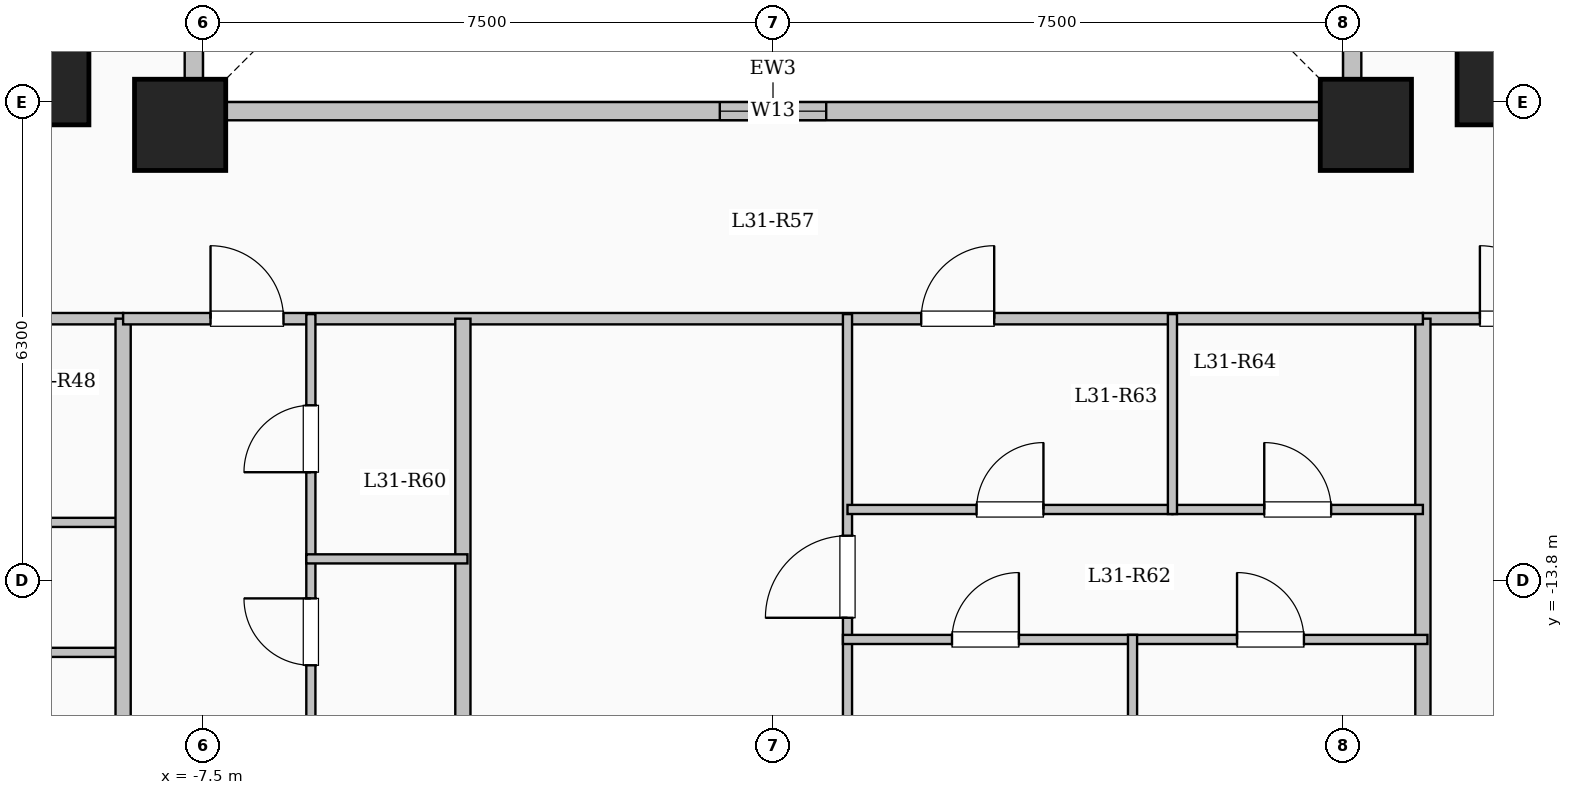
"""IFC4 building model, lengths in metres.
Left out: names, types, materials, properties, quantities, classifications, styles, units other than length and angle.
Written with IfcOpenShell. Run it as: python <this file> out.ifc"""

import sys

from ifc_helpers import new_model, si_unit, direction, frame, frame_2d, origin, origin_2d, place, context, subcontext, project, spatial, rectangle, extrude, element, fill, save


model = new_model("IFC4")
c1 = context("Model", 3, precision=1e-05, world=origin(), true_north=direction((0.0, 1.0)))
c2 = subcontext(c1, "Body", "Model", "MODEL_VIEW")
j1 = project(units=[si_unit("LENGTHUNIT", "METRE"), si_unit("PLANEANGLEUNIT", "RADIAN")], contexts=[c1])
p1 = place(None, origin())
s1 = spatial("IfcSite", under=j1, at=p1, CompositionType="ELEMENT")
p2 = place(p1, origin())
s2 = spatial("IfcBuilding", under=s1, at=p2, CompositionType="ELEMENT")
p3 = place(p2, frame((0.0, 0.0, 115.15)))
s3 = spatial("IfcBuildingStorey", under=s2, at=p3, CompositionType="ELEMENT", Elevation=115.15)
for number, where, z_axis, x_axis in (
    (1, (-7.8, -7.8, 0.0), (0.0, 0.0, 1.0), (1.0, 0.0, 0.0)),
    (2, (7.8, -7.8, 0.0), (0.0, 0.0, 1.0), (1.0, 0.0, 0.0)),
    (3, (-9.6, -7.2, 0.0), (0.0, 0.0, 1.0), (1.0, 0.0, 0.0)),
    (4, (9.6, -7.2, 0.0), (0.0, 0.0, 1.0), (1.0, 0.0, 0.0)),
):
    element("IfcColumn", number, at=place(p3, frame(where, z_axis=z_axis, x_axis=x_axis)), inside=s3, PredefinedType="COLUMN", context=c2, shape_type="SweptSolid", body=[
        extrude(rectangle(XDim=1.2, YDim=1.2, at=origin_2d()), origin(), (0.0, 0.0, 1.0), 3.35),
    ])
p4 = place(p3, frame((-7.62, -7.62, 0.0), z_axis=(0.0, 0.0, 1.0), x_axis=(1.0, 0.0, 0.0)))
e5 = element("IfcWall", 5, at=p4, inside=s3, PredefinedType="SOLIDWALL", context=c2, shape_type="SweptSolid", body=[
    extrude(rectangle(XDim=15.24, YDim=0.24, at=frame_2d((7.62, 0.0))), origin(), (0.0, 0.0, 1.0), 3.05),
])
p5 = place(p4, frame((6.92, 0.0, 0.95)))
e6 = element("IfcOpeningElement", 6, at=p5, cuts=e5, PredefinedType="OPENING", context=c2, shape_type="SweptSolid", body=[
    extrude(rectangle(XDim=1.4, YDim=1.5, at=frame_2d((0.7, 0.75))), frame((0.0, 0.13, 0.0), z_axis=(0.0, -1.0, 0.0), x_axis=(1.0, 0.0, 0.0)), (0.0, 0.0, 1.0), 0.26),
])
p6 = place(p3, frame((7.62, -7.62, 0.0), z_axis=(0.0, 0.0, 1.0), x_axis=(0.0, 1.0, 0.0)))
e7 = element("IfcWall", 7, at=p6, inside=s3, PredefinedType="SOLIDWALL", context=c2, shape_type="SweptSolid", body=[
    extrude(rectangle(XDim=15.24, YDim=0.24, at=frame_2d((7.62, 0.0))), origin(), (0.0, 0.0, 1.0), 3.05),
])
p7 = place(p6, frame((6.92, 0.0, 0.95)))
e8 = element("IfcOpeningElement", 8, at=p7, cuts=e7, PredefinedType="OPENING", context=c2, shape_type="SweptSolid", body=[
    extrude(rectangle(XDim=1.4, YDim=1.5, at=frame_2d((0.7, 0.75))), frame((0.0, 0.13, 0.0), z_axis=(0.0, -1.0, 0.0), x_axis=(1.0, 0.0, 0.0)), (0.0, 0.0, 1.0), 0.26),
])
p8 = place(p3, frame((-7.62, 7.62, 0.0), z_axis=(0.0, 0.0, 1.0), x_axis=(0.0, -1.0, 0.0)))
e9 = element("IfcWall", 9, at=p8, inside=s3, PredefinedType="SOLIDWALL", context=c2, shape_type="SweptSolid", body=[
    extrude(rectangle(XDim=15.24, YDim=0.24, at=frame_2d((7.62, 0.0))), origin(), (0.0, 0.0, 1.0), 3.05),
])
p9 = place(p8, frame((6.92, 0.0, 0.95)))
e10 = element("IfcOpeningElement", 10, at=p9, cuts=e9, PredefinedType="OPENING", context=c2, shape_type="SweptSolid", body=[
    extrude(rectangle(XDim=1.4, YDim=1.5, at=frame_2d((0.7, 0.75))), frame((0.0, 0.13, 0.0), z_axis=(0.0, -1.0, 0.0), x_axis=(1.0, 0.0, 0.0)), (0.0, 0.0, 1.0), 0.26),
])
p10 = place(p3, frame((-21.05, -10.35, 0.0), z_axis=(0.0, 0.0, 1.0), x_axis=(1.0, 0.0, 0.0)))
e11 = element("IfcWall", 11, at=p10, inside=s3, PredefinedType="PARTITIONING", context=c2, shape_type="SweptSolid", body=[
    extrude(rectangle(XDim=12.5, YDim=0.15, at=frame_2d((6.25, 0.0))), origin(), (0.0, 0.0, 1.0), 3.05),
])
p11 = place(p10, frame((0.7, 0.0, 0.0)))
e12 = element("IfcOpeningElement", 12, at=p11, cuts=e11, PredefinedType="OPENING", context=c2, shape_type="SweptSolid", body=[
    extrude(rectangle(XDim=0.96, YDim=2.15, at=frame_2d((0.48, 1.075))), frame((0.0, 0.085, 0.0), z_axis=(0.0, -1.0, 0.0), x_axis=(1.0, 0.0, 0.0)), (0.0, 0.0, 1.0), 0.17),
])
p12 = place(p3, frame((8.55, -10.35, 0.0), z_axis=(0.0, 0.0, 1.0), x_axis=(1.0, 0.0, 0.0)))
e13 = element("IfcWall", 13, at=p12, inside=s3, PredefinedType="PARTITIONING", context=c2, shape_type="SweptSolid", body=[
    extrude(rectangle(XDim=12.5, YDim=0.15, at=frame_2d((6.25, 0.0))), origin(), (0.0, 0.0, 1.0), 3.05),
])
p13 = place(p12, frame((0.75, 0.0, 0.0)))
e14 = element("IfcOpeningElement", 14, at=p13, cuts=e13, PredefinedType="OPENING", context=c2, shape_type="SweptSolid", body=[
    extrude(rectangle(XDim=0.96, YDim=2.15, at=frame_2d((0.48, 1.075))), frame((0.0, 0.085, 0.0), z_axis=(0.0, -1.0, 0.0), x_axis=(1.0, 0.0, 0.0)), (0.0, 0.0, 1.0), 0.17),
])
p14 = place(p3, frame((-11.841, -13.03, 0.0), z_axis=(0.0, 0.0, 1.0), x_axis=(1.0, 0.0, 0.0)))
e15 = element("IfcWall", 15, at=p14, inside=s3, PredefinedType="PARTITIONING", context=c2, shape_type="SweptSolid", body=[
    extrude(rectangle(XDim=3.241, YDim=0.12, at=frame_2d((1.621, 0.0))), origin(), (0.0, 0.0, 1.0), 3.05),
])
p15 = place(p14, frame((1.18, 0.0, 0.0)))
e16 = element("IfcOpeningElement", 16, at=p15, cuts=e15, PredefinedType="OPENING", context=c2, shape_type="SweptSolid", body=[
    extrude(rectangle(XDim=0.88, YDim=2.1, at=frame_2d((0.44, 1.05))), frame((0.0, 0.07, 0.0), z_axis=(0.0, -1.0, 0.0), x_axis=(1.0, 0.0, 0.0)), (0.0, 0.0, 1.0), 0.14),
])
p16 = place(p3, frame((-16.118, -14.74, 0.0), z_axis=(0.0, 0.0, 1.0), x_axis=(1.0, 0.0, 0.0)))
e17 = element("IfcWall", 17, at=p16, inside=s3, PredefinedType="PARTITIONING", context=c2, shape_type="SweptSolid", body=[
    extrude(rectangle(XDim=7.578, YDim=0.12, at=frame_2d((3.789, 0.0))), origin(), (0.0, 0.0, 1.0), 3.05),
])
p17 = place(p16, frame((1.409, 0.0, 0.0)))
e18 = element("IfcOpeningElement", 18, at=p17, cuts=e17, PredefinedType="OPENING", context=c2, shape_type="SweptSolid", body=[
    extrude(rectangle(XDim=0.88, YDim=2.1, at=frame_2d((0.44, 1.05))), frame((0.0, 0.07, 0.0), z_axis=(0.0, -1.0, 0.0), x_axis=(1.0, 0.0, 0.0)), (0.0, 0.0, 1.0), 0.14),
])
p18 = place(p16, frame((5.108, 0.0, 0.0)))
e19 = element("IfcOpeningElement", 19, at=p18, cuts=e17, PredefinedType="OPENING", context=c2, shape_type="SweptSolid", body=[
    extrude(rectangle(XDim=0.88, YDim=2.1, at=frame_2d((0.44, 1.05))), frame((0.0, 0.07, 0.0), z_axis=(0.0, -1.0, 0.0), x_axis=(1.0, 0.0, 0.0)), (0.0, 0.0, 1.0), 0.14),
])
for number, where, z_axis, x_axis in (
    (20, (-8.55, -22.704, 0.0), (0.0, 0.0, 1.0), (0.0, 1.0, 0.0)),
    (21, (8.55, -22.704, 0.0), (0.0, 0.0, 1.0), (0.0, 1.0, 0.0)),
):
    element("IfcWall", number, at=place(p3, frame(where, z_axis=z_axis, x_axis=x_axis)), inside=s3, PredefinedType="SOLIDWALL", context=c2, shape_type="SweptSolid", body=[
        extrude(rectangle(XDim=12.354, YDim=0.2, at=frame_2d((6.177, 0.0))), origin(), (0.0, 0.0, 1.0), 3.05),
    ])
p19 = place(p3, frame((-8.55, -10.35, 0.0), z_axis=(0.0, 0.0, 1.0), x_axis=(1.0, 0.0, 0.0)))
e22 = element("IfcWall", 22, at=p19, inside=s3, PredefinedType="PARTITIONING", context=c2, shape_type="SweptSolid", body=[
    extrude(rectangle(XDim=17.1, YDim=0.15, at=frame_2d((8.55, 0.0))), origin(), (0.0, 0.0, 1.0), 3.05),
])
p20 = place(p19, frame((1.15, 0.0, 0.0)))
e23 = element("IfcOpeningElement", 23, at=p20, cuts=e22, PredefinedType="OPENING", context=c2, shape_type="SweptSolid", body=[
    extrude(rectangle(XDim=0.96, YDim=2.15, at=frame_2d((0.48, 1.075))), frame((0.0, 0.085, 0.0), z_axis=(0.0, -1.0, 0.0), x_axis=(1.0, 0.0, 0.0)), (0.0, 0.0, 1.0), 0.17),
])
p21 = place(p19, frame((10.5, 0.0, 0.0)))
e24 = element("IfcOpeningElement", 24, at=p21, cuts=e22, PredefinedType="OPENING", context=c2, shape_type="SweptSolid", body=[
    extrude(rectangle(XDim=0.96, YDim=2.15, at=frame_2d((0.48, 1.075))), frame((0.0, 0.085, 0.0), z_axis=(0.0, -1.0, 0.0), x_axis=(1.0, 0.0, 0.0)), (0.0, 0.0, 1.0), 0.17),
])
p22 = place(p3, frame((-4.08, -22.05, 0.0), z_axis=(0.0, 0.0, 1.0), x_axis=(0.0, 1.0, 0.0)))
e25 = element("IfcWall", 25, at=p22, inside=s3, PredefinedType="SOLIDWALL", context=c2, shape_type="SweptSolid", body=[
    extrude(rectangle(XDim=11.7, YDim=0.2, at=frame_2d((5.85, 0.0))), origin(), (0.0, 0.0, 1.0), 3.05),
])
p23 = place(p3, frame((-6.08, -23.314, 0.0), z_axis=(0.0, 0.0, 1.0), x_axis=(0.0, 1.0, 0.0)))
e26 = element("IfcWall", 26, at=p23, inside=s3, PredefinedType="PARTITIONING", context=c2, shape_type="SweptSolid", body=[
    extrude(rectangle(XDim=9.804, YDim=0.12, at=frame_2d((4.902, 0.0))), origin(), (0.0, 0.0, 1.0), 3.05),
])
p24 = place(p23, frame((8.404, 0.0, 0.0)))
e27 = element("IfcOpeningElement", 27, at=p24, cuts=e26, PredefinedType="OPENING", context=c2, shape_type="SweptSolid", body=[
    extrude(rectangle(XDim=0.88, YDim=2.1, at=frame_2d((0.44, 1.05))), frame((0.0, 0.07, 0.0), z_axis=(0.0, -1.0, 0.0), x_axis=(1.0, 0.0, 0.0)), (0.0, 0.0, 1.0), 0.14),
])
p25 = place(p3, frame((-6.08, -13.51, 0.0), z_axis=(0.0, 0.0, 1.0), x_axis=(0.0, 1.0, 0.0)))
e28 = element("IfcWall", 28, at=p25, inside=s3, PredefinedType="PARTITIONING", context=c2, shape_type="SweptSolid", body=[
    extrude(rectangle(XDim=3.22, YDim=0.12, at=frame_2d((1.61, 0.0))), origin(), (0.0, 0.0, 1.0), 3.05),
])
p26 = place(p25, frame((1.14, 0.0, 0.0)))
e29 = element("IfcOpeningElement", 29, at=p26, cuts=e28, PredefinedType="OPENING", context=c2, shape_type="SweptSolid", body=[
    extrude(rectangle(XDim=0.88, YDim=2.1, at=frame_2d((0.44, 1.05))), frame((0.0, 0.07, 0.0), z_axis=(0.0, -1.0, 0.0), x_axis=(1.0, 0.0, 0.0)), (0.0, 0.0, 1.0), 0.14),
])
p27 = place(p3, frame((-6.14, -13.51, 0.0), z_axis=(0.0, 0.0, 1.0), x_axis=(1.0, 0.0, 0.0)))
e30 = element("IfcWall", 30, at=p27, inside=s3, PredefinedType="PARTITIONING", context=c2, shape_type="SweptSolid", body=[
    extrude(rectangle(XDim=2.12, YDim=0.12, at=frame_2d((1.06, 0.0))), origin(), (0.0, 0.0, 1.0), 3.05),
])
p28 = place(p3, frame((0.98, -23.58, 0.0), z_axis=(0.0, 0.0, 1.0), x_axis=(0.0, 1.0, 0.0)))
e31 = element("IfcWall", 31, at=p28, inside=s3, PredefinedType="PARTITIONING", context=c2, shape_type="SweptSolid", body=[
    extrude(rectangle(XDim=13.29, YDim=0.12, at=frame_2d((6.645, 0.0))), origin(), (0.0, 0.0, 1.0), 3.05),
])
p29 = place(p28, frame((9.295, 0.0, 0.0)))
e32 = element("IfcOpeningElement", 32, at=p29, cuts=e31, PredefinedType="OPENING", context=c2, shape_type="SweptSolid", body=[
    extrude(rectangle(XDim=1.08, YDim=2.15, at=frame_2d((0.54, 1.075))), frame((0.0, 0.07, 0.0), z_axis=(0.0, -1.0, 0.0), x_axis=(1.0, 0.0, 0.0)), (0.0, 0.0, 1.0), 0.14),
])
p30 = place(p3, frame((0.98, -12.86, 0.0), z_axis=(0.0, 0.0, 1.0), x_axis=(1.0, 0.0, 0.0)))
e33 = element("IfcWall", 33, at=p30, inside=s3, PredefinedType="PARTITIONING", context=c2, shape_type="SweptSolid", body=[
    extrude(rectangle(XDim=4.275, YDim=0.12, at=frame_2d((2.137, 0.0))), origin(), (0.0, 0.0, 1.0), 3.05),
])
p31 = place(p30, frame((1.698, 0.0, 0.0)))
e34 = element("IfcOpeningElement", 34, at=p31, cuts=e33, PredefinedType="OPENING", context=c2, shape_type="SweptSolid", body=[
    extrude(rectangle(XDim=0.88, YDim=2.1, at=frame_2d((0.44, 1.05))), frame((0.0, 0.07, 0.0), z_axis=(0.0, -1.0, 0.0), x_axis=(1.0, 0.0, 0.0)), (0.0, 0.0, 1.0), 0.14),
])
p32 = place(p3, frame((5.255, -12.86, 0.0), z_axis=(0.0, 0.0, 1.0), x_axis=(1.0, 0.0, 0.0)))
e35 = element("IfcWall", 35, at=p32, inside=s3, PredefinedType="PARTITIONING", context=c2, shape_type="SweptSolid", body=[
    extrude(rectangle(XDim=3.295, YDim=0.12, at=frame_2d((1.647, 0.0))), origin(), (0.0, 0.0, 1.0), 3.05),
])
p33 = place(p32, frame((1.208, 0.0, 0.0)))
e36 = element("IfcOpeningElement", 36, at=p33, cuts=e35, PredefinedType="OPENING", context=c2, shape_type="SweptSolid", body=[
    extrude(rectangle(XDim=0.88, YDim=2.1, at=frame_2d((0.44, 1.05))), frame((0.0, 0.07, 0.0), z_axis=(0.0, -1.0, 0.0), x_axis=(1.0, 0.0, 0.0)), (0.0, 0.0, 1.0), 0.14),
])
p34 = place(p3, frame((0.92, -14.57, 0.0), z_axis=(0.0, 0.0, 1.0), x_axis=(1.0, 0.0, 0.0)))
e37 = element("IfcWall", 37, at=p34, inside=s3, PredefinedType="PARTITIONING", context=c2, shape_type="SweptSolid", body=[
    extrude(rectangle(XDim=7.69, YDim=0.12, at=frame_2d((3.845, 0.0))), origin(), (0.0, 0.0, 1.0), 2.585),
])
p35 = place(p34, frame((1.435, 0.0, 0.0)))
e38 = element("IfcOpeningElement", 38, at=p35, cuts=e37, PredefinedType="OPENING", context=c2, shape_type="SweptSolid", body=[
    extrude(rectangle(XDim=0.88, YDim=2.1, at=frame_2d((0.44, 1.05))), frame((0.0, 0.07, 0.0), z_axis=(0.0, -1.0, 0.0), x_axis=(1.0, 0.0, 0.0)), (0.0, 0.0, 1.0), 0.14),
])
p36 = place(p34, frame((5.185, 0.0, 0.0)))
e39 = element("IfcOpeningElement", 39, at=p36, cuts=e37, PredefinedType="OPENING", context=c2, shape_type="SweptSolid", body=[
    extrude(rectangle(XDim=0.88, YDim=2.1, at=frame_2d((0.44, 1.05))), frame((0.0, 0.07, 0.0), z_axis=(0.0, -1.0, 0.0), x_axis=(1.0, 0.0, 0.0)), (0.0, 0.0, 1.0), 0.14),
])
p37 = place(p3, frame((5.255, -12.92, 0.0), z_axis=(0.0, 0.0, 1.0), x_axis=(0.0, 1.0, 0.0)))
e40 = element("IfcWall", 40, at=p37, inside=s3, PredefinedType="PARTITIONING", context=c2, shape_type="SweptSolid", body=[
    extrude(rectangle(XDim=2.63, YDim=0.12, at=frame_2d((1.315, 0.0))), origin(), (0.0, 0.0, 1.0), 3.05),
])
p38 = place(p3, frame((4.73, -23.58, 0.0), z_axis=(0.0, 0.0, 1.0), x_axis=(0.0, 1.0, 0.0)))
e41 = element("IfcWall", 41, at=p38, inside=s3, PredefinedType="PARTITIONING", context=c2, shape_type="SweptSolid", body=[
    extrude(rectangle(XDim=9.07, YDim=0.12, at=frame_2d((4.535, 0.0))), origin(), (0.0, 0.0, 1.0), 3.05),
])
p39 = place(p5, origin())
e42 = element("IfcWindow", 42, at=p39, inside=s3, PartitioningType="SINGLE_PANEL", PredefinedType="WINDOW", context=c2, shape_type="SweptSolid", body=[
    extrude(rectangle(XDim=1.4, YDim=1.5, at=frame_2d((0.7, 0.75))), frame((0.0, 0.03, 0.0), z_axis=(0.0, -1.0, 0.0), x_axis=(1.0, 0.0, 0.0)), (0.0, 0.0, 1.0), 0.06),
])
fill(e6, e42)
p40 = place(p13, origin())
e43 = element("IfcDoor", 43, at=p40, inside=s3, OperationType="SINGLE_SWING_LEFT", PredefinedType="DOOR", context=c2, shape_type="SweptSolid", body=[
    extrude(rectangle(XDim=0.96, YDim=2.15, at=frame_2d((0.48, 1.075))), frame((0.0, 0.025, 0.0), z_axis=(0.0, -1.0, 0.0), x_axis=(1.0, 0.0, 0.0)), (0.0, 0.0, 1.0), 0.05),
])
fill(e14, e43)
p41 = place(p20, origin())
e44 = element("IfcDoor", 44, at=p41, inside=s3, OperationType="SINGLE_SWING_LEFT", PredefinedType="DOOR", context=c2, shape_type="SweptSolid", body=[
    extrude(rectangle(XDim=0.96, YDim=2.15, at=frame_2d((0.48, 1.075))), frame((0.0, 0.025, 0.0), z_axis=(0.0, -1.0, 0.0), x_axis=(1.0, 0.0, 0.0)), (0.0, 0.0, 1.0), 0.05),
])
fill(e23, e44)
p42 = place(p24, origin())
e45 = element("IfcDoor", 45, at=p42, inside=s3, OperationType="SINGLE_SWING_RIGHT", PredefinedType="DOOR", context=c2, shape_type="SweptSolid", body=[
    extrude(rectangle(XDim=0.88, YDim=2.1, at=frame_2d((0.44, 1.05))), frame((0.0, 0.025, 0.0), z_axis=(0.0, -1.0, 0.0), x_axis=(1.0, 0.0, 0.0)), (0.0, 0.0, 1.0), 0.05),
])
fill(e27, e45)
p43 = place(p26, origin())
e46 = element("IfcDoor", 46, at=p43, inside=s3, OperationType="SINGLE_SWING_LEFT", PredefinedType="DOOR", context=c2, shape_type="SweptSolid", body=[
    extrude(rectangle(XDim=0.88, YDim=2.1, at=frame_2d((0.44, 1.05))), frame((0.0, 0.025, 0.0), z_axis=(0.0, -1.0, 0.0), x_axis=(1.0, 0.0, 0.0)), (0.0, 0.0, 1.0), 0.05),
])
fill(e29, e46)
p44 = place(p21, origin())
e47 = element("IfcDoor", 47, at=p44, inside=s3, OperationType="SINGLE_SWING_RIGHT", PredefinedType="DOOR", context=c2, shape_type="SweptSolid", body=[
    extrude(rectangle(XDim=0.96, YDim=2.15, at=frame_2d((0.48, 1.075))), frame((0.0, 0.025, 0.0), z_axis=(0.0, -1.0, 0.0), x_axis=(1.0, 0.0, 0.0)), (0.0, 0.0, 1.0), 0.05),
])
fill(e24, e47)
p45 = place(p29, origin())
e48 = element("IfcDoor", 48, at=p45, inside=s3, OperationType="SINGLE_SWING_LEFT", PredefinedType="DOOR", context=c2, shape_type="SweptSolid", body=[
    extrude(rectangle(XDim=1.08, YDim=2.15, at=frame_2d((0.54, 1.075))), frame((0.0, 0.025, 0.0), z_axis=(0.0, -1.0, 0.0), x_axis=(1.0, 0.0, 0.0)), (0.0, 0.0, 1.0), 0.05),
])
fill(e32, e48)
p46 = place(p31, origin())
e49 = element("IfcDoor", 49, at=p46, inside=s3, OperationType="SINGLE_SWING_RIGHT", PredefinedType="DOOR", context=c2, shape_type="SweptSolid", body=[
    extrude(rectangle(XDim=0.88, YDim=2.1, at=frame_2d((0.44, 1.05))), frame((0.0, 0.025, 0.0), z_axis=(0.0, -1.0, 0.0), x_axis=(1.0, 0.0, 0.0)), (0.0, 0.0, 1.0), 0.05),
])
fill(e34, e49)
p47 = place(p33, origin())
e50 = element("IfcDoor", 50, at=p47, inside=s3, OperationType="SINGLE_SWING_LEFT", PredefinedType="DOOR", context=c2, shape_type="SweptSolid", body=[
    extrude(rectangle(XDim=0.88, YDim=2.1, at=frame_2d((0.44, 1.05))), frame((0.0, 0.025, 0.0), z_axis=(0.0, -1.0, 0.0), x_axis=(1.0, 0.0, 0.0)), (0.0, 0.0, 1.0), 0.05),
])
fill(e36, e50)
p48 = place(p35, origin())
e51 = element("IfcDoor", 51, at=p48, inside=s3, OperationType="SINGLE_SWING_RIGHT", PredefinedType="DOOR", context=c2, shape_type="SweptSolid", body=[
    extrude(rectangle(XDim=0.88, YDim=2.1, at=frame_2d((0.44, 1.05))), frame((0.0, 0.025, 0.0), z_axis=(0.0, -1.0, 0.0), x_axis=(1.0, 0.0, 0.0)), (0.0, 0.0, 1.0), 0.05),
])
fill(e38, e51)
p49 = place(p36, origin())
e52 = element("IfcDoor", 52, at=p49, inside=s3, OperationType="SINGLE_SWING_LEFT", PredefinedType="DOOR", context=c2, shape_type="SweptSolid", body=[
    extrude(rectangle(XDim=0.88, YDim=2.1, at=frame_2d((0.44, 1.05))), frame((0.0, 0.025, 0.0), z_axis=(0.0, -1.0, 0.0), x_axis=(1.0, 0.0, 0.0)), (0.0, 0.0, 1.0), 0.05),
])
fill(e39, e52)
save(model, sys.argv[1])
